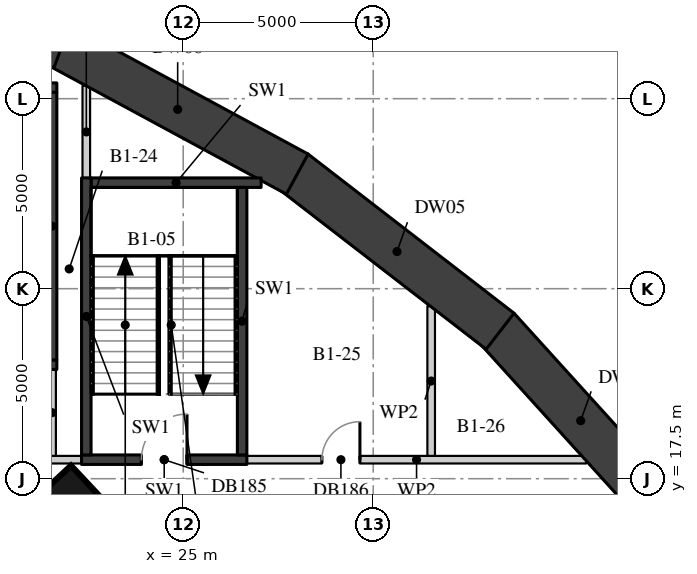
"""IFC4 building model, lengths in metres.
Left out: names, types, materials, properties, quantities, classifications, styles, units other than length and angle.
Written with IfcOpenShell. Run it as: python <this file> out.ifc"""

import sys

from ifc_helpers import new_model, si_unit, direction, frame, frame_2d, origin, origin_2d, place, context, subcontext, project, spatial, rectangle, extrude, element, fill, save


model = new_model("IFC4")
c1 = context("Model", 3, precision=1e-05, world=origin(), true_north=direction((0.0, 1.0)))
c2 = subcontext(c1, "Body", "Model", "MODEL_VIEW")
j1 = project(units=[si_unit("LENGTHUNIT", "METRE"), si_unit("PLANEANGLEUNIT", "RADIAN")], contexts=[c1])
p1 = place(None, origin())
s1 = spatial("IfcSite", under=j1, at=p1, CompositionType="ELEMENT")
p2 = place(p1, origin())
s2 = spatial("IfcBuilding", under=s1, at=p2, CompositionType="ELEMENT")
p3 = place(p2, frame((0.0, 0.0, -5.2)))
s3 = spatial("IfcBuildingStorey", under=s2, at=p3, CompositionType="ELEMENT", Elevation=-5.2)
p4 = place(p3, frame((37.657, 16.601, 0.0), z_axis=(0.0, 0.0, 1.0), x_axis=(-0.671487423502, 0.741015951299, 0.0)))
e1 = element("IfcWall", 1, at=p4, inside=s3, PredefinedType="USERDEFINED", context=c2, shape_type="SweptSolid", body=[
    extrude(rectangle(XDim=6.545, YDim=1.2, at=frame_2d((3.272, 0.0))), origin(), (0.0, 0.0, 1.0), 5.2),
])
p5 = place(p3, frame((33.339, 21.38, 0.0), z_axis=(0.0, 0.0, 1.0), x_axis=(-0.791286567459, 0.611445474396, 0.0)))
e2 = element("IfcWall", 2, at=p5, inside=s3, PredefinedType="USERDEFINED", context=c2, shape_type="SweptSolid", body=[
    extrude(rectangle(XDim=6.857, YDim=1.2, at=frame_2d((3.428, 0.0))), origin(), (0.0, 0.0, 1.0), 5.2),
])
p6 = place(p3, frame((28.0, 25.516, 0.0), z_axis=(0.0, 0.0, 1.0), x_axis=(-0.879519330959, 0.475863159394, 0.0)))
e3 = element("IfcWall", 3, at=p6, inside=s3, PredefinedType="USERDEFINED", context=c2, shape_type="SweptSolid", body=[
    extrude(rectangle(XDim=7.155, YDim=1.2, at=frame_2d((3.577, 0.0))), origin(), (0.0, 0.0, 1.0), 5.2),
])
p7 = place(p3, frame((21.803, 28.878, 0.0), z_axis=(0.0, 0.0, 1.0), x_axis=(-0.940789454531, 0.338991448628, 0.0)))
e4 = element("IfcWall", 4, at=p7, inside=s3, PredefinedType="USERDEFINED", context=c2, shape_type="SweptSolid", body=[
    extrude(rectangle(XDim=7.406, YDim=1.2, at=frame_2d((3.703, 0.0))), origin(), (0.0, 0.0, 1.0), 5.2),
])
p8 = place(p3, frame((21.641, 16.23, 0.0), z_axis=(0.0, 0.0, 1.0), x_axis=(0.730113022917, 0.683326403535, 0.0)))
e5 = element("IfcColumn", 5, at=p8, inside=s3, PredefinedType="COLUMN", context=c2, shape_type="SweptSolid", body=[
    extrude(rectangle(XDim=2.8, YDim=1.8, at=origin_2d()), origin(), (0.0, 0.0, 1.0), 5.2),
])
p9 = place(p3, frame((-17.715, 18.0, 0.0), z_axis=(0.0, 0.0, 1.0), x_axis=(1.0, 0.0, 0.0)))
e6 = element("IfcWall", 6, at=p9, inside=s3, PredefinedType="PARTITIONING", context=c2, shape_type="SweptSolid", body=[
    extrude(rectangle(XDim=40.04, YDim=0.2, at=frame_2d((20.02, 0.0))), origin(), (0.0, 0.0, 1.0), 4.79),
])
p10 = place(p9, frame((13.908, 0.0, 0.0)))
e7 = element("IfcOpeningElement", 7, at=p10, cuts=e6, PredefinedType="OPENING", context=c2, shape_type="SweptSolid", body=[
    extrude(rectangle(XDim=1.0, YDim=2.1, at=frame_2d((0.5, 1.05))), frame((0.0, 0.11, 0.0), z_axis=(0.0, -1.0, 0.0), x_axis=(1.0, 0.0, 0.0)), (0.0, 0.0, 1.0), 0.22),
])
p11 = place(p9, frame((30.365, 0.0, 0.0)))
e8 = element("IfcOpeningElement", 8, at=p11, cuts=e6, PredefinedType="OPENING", context=c2, shape_type="SweptSolid", body=[
    extrude(rectangle(XDim=1.2, YDim=2.1, at=frame_2d((0.6, 1.05))), frame((0.0, 0.11, 0.0), z_axis=(0.0, -1.0, 0.0), x_axis=(1.0, 0.0, 0.0)), (0.0, 0.0, 1.0), 0.22),
])
p12 = place(p9, frame((33.59, 0.0, 0.0)))
e9 = element("IfcOpeningElement", 9, at=p12, cuts=e6, PredefinedType="OPENING", context=c2, shape_type="SweptSolid", body=[
    extrude(rectangle(XDim=1.0, YDim=2.1, at=frame_2d((0.5, 1.05))), frame((0.0, 0.11, 0.0), z_axis=(0.0, -1.0, 0.0), x_axis=(1.0, 0.0, 0.0)), (0.0, 0.0, 1.0), 0.22),
])
p13 = place(p9, frame((36.615, 0.0, 0.0)))
e10 = element("IfcOpeningElement", 10, at=p13, cuts=e6, PredefinedType="OPENING", context=c2, shape_type="SweptSolid", body=[
    extrude(rectangle(XDim=1.2, YDim=2.1, at=frame_2d((0.6, 1.05))), frame((0.0, 0.11, 0.0), z_axis=(0.0, -1.0, 0.0), x_axis=(1.0, 0.0, 0.0)), (0.0, 0.0, 1.0), 0.22),
])
p14 = place(p3, frame((22.325, 18.0, 0.0), z_axis=(0.0, 0.0, 1.0), x_axis=(1.0, 0.0, 0.0)))
e11 = element("IfcWall", 11, at=p14, inside=s3, PredefinedType="SOLIDWALL", context=c2, shape_type="SweptSolid", body=[
    extrude(rectangle(XDim=4.35, YDim=0.25, at=frame_2d((2.175, 0.0))), origin(), (0.0, 0.0, 1.0), 4.79),
])
p15 = place(p14, frame((1.575, 0.0, 0.0)))
e12 = element("IfcOpeningElement", 12, at=p15, cuts=e11, PredefinedType="OPENING", context=c2, shape_type="SweptSolid", body=[
    extrude(rectangle(XDim=1.2, YDim=2.1, at=frame_2d((0.6, 1.05))), frame((0.0, 0.135, 0.0), z_axis=(0.0, -1.0, 0.0), x_axis=(1.0, 0.0, 0.0)), (0.0, 0.0, 1.0), 0.27),
])
p16 = place(p3, frame((26.675, 18.0, 0.0), z_axis=(0.0, 0.0, 1.0), x_axis=(1.0, 0.0, 0.0)))
e13 = element("IfcWall", 13, at=p16, inside=s3, PredefinedType="PARTITIONING", context=c2, shape_type="SweptSolid", body=[
    extrude(rectangle(XDim=8.93, YDim=0.2, at=frame_2d((4.465, 0.0))), origin(), (0.0, 0.0, 1.0), 4.79),
])
p17 = place(p16, frame((1.975, 0.0, 0.0)))
e14 = element("IfcOpeningElement", 14, at=p17, cuts=e13, PredefinedType="OPENING", context=c2, shape_type="SweptSolid", body=[
    extrude(rectangle(XDim=1.0, YDim=2.1, at=frame_2d((0.5, 1.05))), frame((0.0, 0.11, 0.0), z_axis=(0.0, -1.0, 0.0), x_axis=(1.0, 0.0, 0.0)), (0.0, 0.0, 1.0), 0.22),
])
p18 = place(p3, frame((17.325, 20.5, 0.0), z_axis=(0.0, 0.0, 1.0), x_axis=(1.0, 0.0, 0.0)))
e15 = element("IfcWall", 15, at=p18, inside=s3, PredefinedType="SOLIDWALL", context=c2, shape_type="SweptSolid", body=[
    extrude(rectangle(XDim=4.35, YDim=0.25, at=frame_2d((2.175, 0.0))), origin(), (0.0, 0.0, 1.0), 4.79),
])
p19 = place(p18, frame((1.575, 0.0, 0.0)))
e16 = element("IfcOpeningElement", 16, at=p19, cuts=e15, PredefinedType="OPENING", context=c2, shape_type="SweptSolid", body=[
    extrude(rectangle(XDim=1.2, YDim=2.1, at=frame_2d((0.6, 1.05))), frame((0.0, 0.135, 0.0), z_axis=(0.0, -1.0, 0.0), x_axis=(1.0, 0.0, 0.0)), (0.0, 0.0, 1.0), 0.27),
])
p20 = place(p3, frame((22.575, 25.29, 0.0), z_axis=(0.0, 0.0, 1.0), x_axis=(1.0, 0.0, 0.0)))
e17 = element("IfcWall", 17, at=p20, inside=s3, PredefinedType="SOLIDWALL", context=c2, shape_type="SweptSolid", body=[
    extrude(rectangle(XDim=4.475, YDim=0.25, at=frame_2d((2.238, 0.0))), origin(), (0.0, 0.0, 1.0), 4.79),
])
p21 = place(p3, frame((17.575, 27.79, 0.0), z_axis=(0.0, 0.0, 1.0), x_axis=(1.0, 0.0, 0.0)))
e18 = element("IfcWall", 18, at=p21, inside=s3, PredefinedType="SOLIDWALL", context=c2, shape_type="SweptSolid", body=[
    extrude(rectangle(XDim=4.1, YDim=0.25, at=frame_2d((2.05, 0.0))), origin(), (0.0, 0.0, 1.0), 4.79),
])
p22 = place(p3, frame((21.55, 18.1, 0.0), z_axis=(0.0, 0.0, 1.0), x_axis=(0.0, 1.0, 0.0)))
e19 = element("IfcWall", 19, at=p22, inside=s3, PredefinedType="PARTITIONING", context=c2, shape_type="SweptSolid", body=[
    extrude(rectangle(XDim=2.275, YDim=0.2, at=frame_2d((1.137, 0.0))), origin(), (0.0, 0.0, 1.0), 4.79),
])
p23 = place(p3, frame((21.55, 20.625, 0.0), z_axis=(0.0, 0.0, 1.0), x_axis=(0.0, 1.0, 0.0)))
e20 = element("IfcWall", 20, at=p23, inside=s3, PredefinedType="SOLIDWALL", context=c2, shape_type="SweptSolid", body=[
    extrude(rectangle(XDim=7.04, YDim=0.25, at=frame_2d((3.52, 0.0))), origin(), (0.0, 0.0, 1.0), 4.79),
])
p24 = place(p3, frame((22.45, 18.125, 0.0), z_axis=(0.0, 0.0, 1.0), x_axis=(0.0, 1.0, 0.0)))
e21 = element("IfcWall", 21, at=p24, inside=s3, PredefinedType="SOLIDWALL", context=c2, shape_type="SweptSolid", body=[
    extrude(rectangle(XDim=7.29, YDim=0.25, at=frame_2d((3.645, 0.0))), origin(), (0.0, 0.0, 1.0), 4.79),
])
p25 = place(p3, frame((22.45, 25.415, 0.0), z_axis=(0.0, 0.0, 1.0), x_axis=(0.0, 1.0, 0.0)))
e22 = element("IfcWall", 22, at=p25, inside=s3, PredefinedType="PARTITIONING", context=c2, shape_type="SweptSolid", body=[
    extrude(rectangle(XDim=2.421, YDim=0.2, at=frame_2d((1.211, 0.0))), origin(), (0.0, 0.0, 1.0), 4.79),
])
p26 = place(p3, frame((26.55, 18.125, 0.0), z_axis=(0.0, 0.0, 1.0), x_axis=(0.0, 1.0, 0.0)))
e23 = element("IfcWall", 23, at=p26, inside=s3, PredefinedType="SOLIDWALL", context=c2, shape_type="SweptSolid", body=[
    extrude(rectangle(XDim=7.04, YDim=0.25, at=frame_2d((3.52, 0.0))), origin(), (0.0, 0.0, 1.0), 4.79),
])
p27 = place(p3, frame((31.525, 18.1, 0.0), z_axis=(0.0, 0.0, 1.0), x_axis=(0.0, 1.0, 0.0)))
e24 = element("IfcWall", 24, at=p27, inside=s3, PredefinedType="PARTITIONING", context=c2, shape_type="SweptSolid", body=[
    extrude(rectangle(XDim=3.94, YDim=0.2, at=frame_2d((1.97, 0.0))), origin(), (0.0, 0.0, 1.0), 4.79),
])
p28 = place(p15, origin())
e25 = element("IfcDoor", 25, at=p28, inside=s3, OperationType="SINGLE_SWING_RIGHT", PredefinedType="DOOR", context=c2, shape_type="SweptSolid", body=[
    extrude(rectangle(XDim=1.2, YDim=2.1, at=frame_2d((0.6, 1.05))), frame((0.0, 0.025, 0.0), z_axis=(0.0, -1.0, 0.0), x_axis=(1.0, 0.0, 0.0)), (0.0, 0.0, 1.0), 0.05),
])
fill(e12, e25)
p29 = place(p17, origin())
e26 = element("IfcDoor", 26, at=p29, inside=s3, OperationType="SINGLE_SWING_RIGHT", PredefinedType="DOOR", context=c2, shape_type="SweptSolid", body=[
    extrude(rectangle(XDim=1.0, YDim=2.1, at=frame_2d((0.5, 1.05))), frame((0.0, 0.025, 0.0), z_axis=(0.0, -1.0, 0.0), x_axis=(1.0, 0.0, 0.0)), (0.0, 0.0, 1.0), 0.05),
])
fill(e14, e26)
save(model, sys.argv[1])
